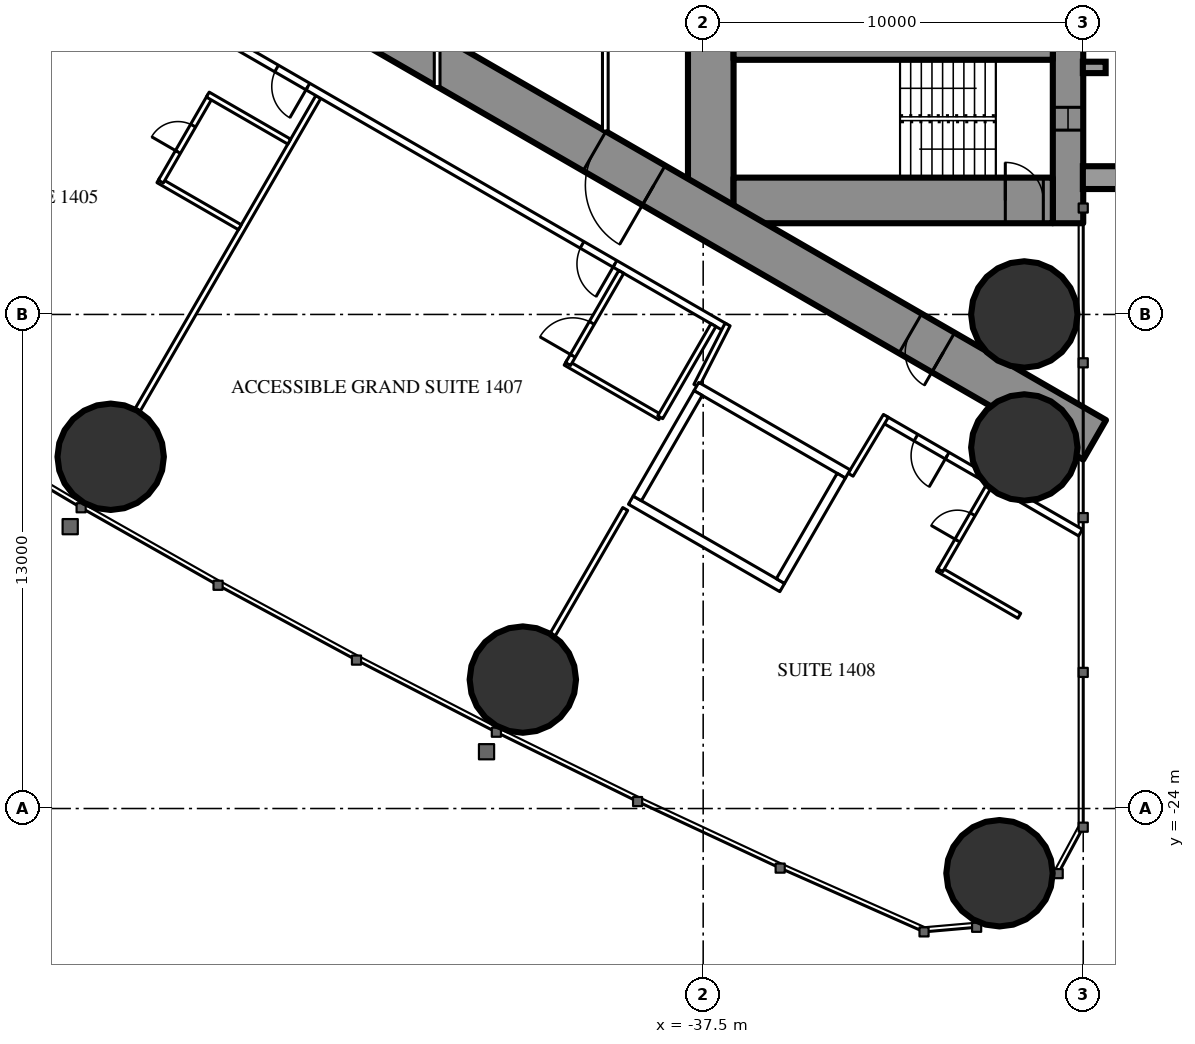
"""IFC4 building model, lengths in metres.
Left out: names, types, materials, properties, quantities, classifications, styles, units other than length and angle.
Written with IfcOpenShell. Run it as: python <this file> out.ifc"""

import sys

from ifc_helpers import new_model, si_unit, direction, frame, frame_2d, origin, origin_2d, place, context, subcontext, project, spatial, rectangle, hollow_circle, extrude, element, fill, save


model = new_model("IFC4")
c1 = context("Model", 3, precision=1e-05, world=origin(), true_north=direction((0.0, 1.0)))
c2 = subcontext(c1, "Body", "Model", "MODEL_VIEW")
j1 = project(units=[si_unit("LENGTHUNIT", "METRE"), si_unit("PLANEANGLEUNIT", "RADIAN")], contexts=[c1])
p1 = place(None, origin())
s1 = spatial("IfcSite", under=j1, at=p1, CompositionType="ELEMENT")
p2 = place(p1, origin())
s2 = spatial("IfcBuilding", under=s1, at=p2, CompositionType="ELEMENT")
p3 = place(p2, frame((0.0, 0.0, 56.5)))
s3 = spatial("IfcBuildingStorey", under=s2, at=p3, CompositionType="ELEMENT", Elevation=56.5)
for number, where, z_axis, x_axis in (
    (1, (-29.703, -25.703, 0.0), (0.0, 0.0, 1.0), (1.0, 0.0, 0.0)),
    (2, (-29.05, -11.0, 0.0), (0.0, 0.0, 1.0), (1.0, 0.0, 0.0)),
    (3, (-29.05, -14.5, 0.0), (0.0, 0.0, 1.0), (1.0, 0.0, 0.0)),
    (4, (-53.09, -14.745, 0.0), (0.0, 0.0, 1.0), (1.0, 0.0, 0.0)),
    (5, (-42.245, -20.607, 0.0), (0.0, 0.0, 1.0), (1.0, 0.0, 0.0)),
):
    element("IfcColumn", number, at=place(p3, frame(where, z_axis=z_axis, x_axis=x_axis)), inside=s3, PredefinedType="COLUMN", context=c2, shape_type="SweptSolid", body=[
        extrude(hollow_circle(Radius=1.4, WallThickness=0.12, at=origin_2d()), origin(), (0.0, 0.0, 1.0), 3.5),
    ])
p4 = place(p3, frame((-27.9, 8.6, 0.0), z_axis=(0.0, 0.0, 1.0), x_axis=(0.0, -1.0, 0.0)))
e6 = element("IfcWall", 6, at=p4, inside=s3, PredefinedType="SHEAR", context=c2, shape_type="SweptSolid", body=[
    extrude(rectangle(XDim=17.2, YDim=0.8, at=frame_2d((8.6, 0.0))), origin(), (0.0, 0.0, 1.0), 3.5),
])
p5 = place(p4, frame((2.45, 0.0, 0.6)))
e7 = element("IfcOpeningElement", 7, at=p5, cuts=e6, PredefinedType="OPENING", context=c2, shape_type="SweptSolid", body=[
    extrude(rectangle(XDim=0.6, YDim=2.1, at=frame_2d((0.3, 1.05))), frame((0.0, 0.41, 0.0), z_axis=(0.0, -1.0, 0.0), x_axis=(1.0, 0.0, 0.0)), (0.0, 0.0, 1.0), 0.82),
])
p6 = place(p4, frame((14.15, 0.0, 0.6)))
e8 = element("IfcOpeningElement", 8, at=p6, cuts=e6, PredefinedType="OPENING", context=c2, shape_type="SweptSolid", body=[
    extrude(rectangle(XDim=0.6, YDim=2.1, at=frame_2d((0.3, 1.05))), frame((0.0, 0.41, 0.0), z_axis=(0.0, -1.0, 0.0), x_axis=(1.0, 0.0, 0.0)), (0.0, 0.0, 1.0), 0.82),
])
p7 = place(p3, frame((-37.3, 8.6, 0.0), z_axis=(0.0, 0.0, 1.0), x_axis=(0.0, -1.0, 0.0)))
e9 = element("IfcWall", 9, at=p7, inside=s3, PredefinedType="SHEAR", context=c2, shape_type="SweptSolid", body=[
    extrude(rectangle(XDim=17.2, YDim=1.2, at=frame_2d((8.6, 0.0))), origin(), (0.0, 0.0, 1.0), 3.5),
])
p8 = place(p7, frame((7.7, 0.0, 0.0)))
e10 = element("IfcOpeningElement", 10, at=p8, cuts=e9, PredefinedType="OPENING", context=c2, shape_type="SweptSolid", body=[
    extrude(rectangle(XDim=1.8, YDim=2.2, at=frame_2d((0.9, 1.1))), frame((0.0, 0.61, 0.0), z_axis=(0.0, -1.0, 0.0), x_axis=(1.0, 0.0, 0.0)), (0.0, 0.0, 1.0), 1.22),
])
p9 = place(p3, frame((-28.3, -8.0, 0.0), z_axis=(0.0, 0.0, 1.0), x_axis=(-1.0, 0.0, 0.0)))
e11 = element("IfcWall", 11, at=p9, inside=s3, PredefinedType="SHEAR", context=c2, shape_type="SweptSolid", body=[
    extrude(rectangle(XDim=8.4, YDim=1.2, at=frame_2d((4.2, 0.0))), origin(), (0.0, 0.0, 1.0), 3.5),
])
p10 = place(p9, frame((0.25, 0.0, 0.0)))
e12 = element("IfcOpeningElement", 12, at=p10, cuts=e11, PredefinedType="OPENING", context=c2, shape_type="SweptSolid", body=[
    extrude(rectangle(XDim=1.0, YDim=2.2, at=frame_2d((0.5, 1.1))), frame((0.0, 0.61, 0.0), z_axis=(0.0, -1.0, 0.0), x_axis=(1.0, 0.0, 0.0)), (0.0, 0.0, 1.0), 1.22),
])
p11 = place(p3, frame((-28.3, -4.15, 0.0), z_axis=(0.0, 0.0, 1.0), x_axis=(-1.0, 0.0, 0.0)))
e13 = element("IfcWall", 13, at=p11, inside=s3, PredefinedType="SHEAR", context=c2, shape_type="SweptSolid", body=[
    extrude(rectangle(XDim=8.4, YDim=0.3, at=frame_2d((4.2, 0.0))), origin(), (0.0, 0.0, 1.0), 3.5),
])
p12 = place(p3, frame((-27.2, -14.3, 0.0), z_axis=(0.0, 0.0, 1.0), x_axis=(-0.866024021859, 0.500002393557, 0.0)))
e14 = element("IfcWall", 14, at=p12, inside=s3, PredefinedType="SHEAR", context=c2, shape_type="SweptSolid", body=[
    extrude(rectangle(XDim=27.907, YDim=1.2, at=frame_2d((13.954, 0.0))), origin(), (0.0, 0.0, 1.0), 3.5),
])
p13 = place(p12, frame((4.6, 0.0, 0.0)))
e15 = element("IfcOpeningElement", 15, at=p13, cuts=e14, PredefinedType="OPENING", context=c2, shape_type="SweptSolid", body=[
    extrude(rectangle(XDim=1.0, YDim=2.2, at=frame_2d((0.5, 1.1))), frame((0.0, 0.61, 0.0), z_axis=(0.0, -1.0, 0.0), x_axis=(1.0, 0.0, 0.0)), (0.0, 0.0, 1.0), 1.22),
])
p14 = place(p12, frame((13.395, 0.0, 0.0)))
e16 = element("IfcOpeningElement", 16, at=p14, cuts=e14, PredefinedType="OPENING", context=c2, shape_type="SweptSolid", body=[
    extrude(rectangle(XDim=1.8, YDim=2.2, at=frame_2d((0.9, 1.1))), frame((0.0, 0.61, 0.0), z_axis=(0.0, -1.0, 0.0), x_axis=(1.0, 0.0, 0.0)), (0.0, 0.0, 1.0), 1.22),
])
p15 = place(p3, frame((-47.627, -5.278, 0.0), z_axis=(0.0, 0.0, 1.0), x_axis=(-0.500009844318, -0.86601972009, 0.0)))
e17 = element("IfcWall", 17, at=p15, inside=s3, PredefinedType="PARTITIONING", context=c2, shape_type="SweptSolid", body=[
    extrude(rectangle(XDim=9.51, YDim=0.15, at=frame_2d((4.755, 0.0))), origin(), (0.0, 0.0, 1.0), 2.25),
])
p16 = place(p3, frame((-39.551, -16.118, 0.0), z_axis=(0.0, 0.0, 1.0), x_axis=(-0.499986503906, -0.866033195618, 0.0)))
e18 = element("IfcWall", 18, at=p16, inside=s3, PredefinedType="PARTITIONING", context=c2, shape_type="SweptSolid", body=[
    extrude(rectangle(XDim=3.815, YDim=0.15, at=frame_2d((1.907, 0.0))), origin(), (0.0, 0.0, 1.0), 3.25),
])
p17 = place(p3, frame((-27.572, -16.741, 0.0), z_axis=(0.0, 0.0, 1.0), x_axis=(-0.866024464444, 0.500001626982, 0.0)))
e19 = element("IfcWall", 19, at=p17, inside=s3, PredefinedType="PARTITIONING", context=c2, shape_type="SweptSolid", body=[
    extrude(rectangle(XDim=5.955, YDim=0.2, at=frame_2d((2.978, 0.0))), origin(), (0.0, 0.0, 1.0), 3.25),
])
p18 = place(p17, frame((4.05, 0.0, 0.0)))
e20 = element("IfcOpeningElement", 20, at=p18, cuts=e19, PredefinedType="OPENING", context=c2, shape_type="SweptSolid", body=[
    extrude(rectangle(XDim=0.95, YDim=2.2, at=frame_2d((0.475, 1.1))), frame((0.0, 0.11, 0.0), z_axis=(0.0, -1.0, 0.0), x_axis=(1.0, 0.0, 0.0)), (0.0, 0.0, 1.0), 0.22),
])
p19 = place(p3, frame((-36.92, -11.344, 0.0), z_axis=(0.0, 0.0, 1.0), x_axis=(-0.866028313256, 0.499994960614, 0.0)))
e21 = element("IfcWall", 21, at=p19, inside=s3, PredefinedType="PARTITIONING", context=c2, shape_type="SweptSolid", body=[
    extrude(rectangle(XDim=22.568, YDim=0.2, at=frame_2d((11.284, 0.0))), origin(), (0.0, 0.0, 1.0), 3.25),
])
p20 = place(p19, frame((12.68, 0.0, 0.0)))
e22 = element("IfcOpeningElement", 22, at=p20, cuts=e21, PredefinedType="OPENING", context=c2, shape_type="SweptSolid", body=[
    extrude(rectangle(XDim=0.95, YDim=2.2, at=frame_2d((0.475, 1.1))), frame((0.0, 0.11, 0.0), z_axis=(0.0, -1.0, 0.0), x_axis=(1.0, 0.0, 0.0)), (0.0, 0.0, 1.0), 0.22),
])
p21 = place(p19, frame((3.35, 0.0, 0.0)))
e23 = element("IfcOpeningElement", 23, at=p21, cuts=e21, PredefinedType="OPENING", context=c2, shape_type="SweptSolid", body=[
    extrude(rectangle(XDim=1.0, YDim=2.2, at=frame_2d((0.5, 1.1))), frame((0.0, 0.11, 0.0), z_axis=(0.0, -1.0, 0.0), x_axis=(1.0, 0.0, 0.0)), (0.0, 0.0, 1.0), 0.22),
])
p22 = place(p3, frame((-36.857, -11.265, 0.0), z_axis=(0.0, 0.0, 1.0), x_axis=(-0.454225294761, -0.890886851176, 0.0)))
e24 = element("IfcWall", 24, at=p22, inside=s3, PredefinedType="PARTITIONING", context=c2, shape_type="SweptSolid", body=[
    extrude(rectangle(XDim=1.807, YDim=0.15, at=frame_2d((0.904, 0.0))), origin(), (0.0, 0.0, 1.0), 3.25),
])
p23 = place(p3, frame((-33.621, -15.218, 0.0), z_axis=(0.0, 0.0, 1.0), x_axis=(0.514336634837, 0.857588377991, 0.0)))
e25 = element("IfcWall", 25, at=p23, inside=s3, PredefinedType="PARTITIONING", context=c2, shape_type="SweptSolid", body=[
    extrude(rectangle(XDim=1.805, YDim=0.15, at=frame_2d((0.903, 0.0))), origin(), (0.0, 0.0, 1.0), 3.25),
])
p24 = place(p3, frame((-49.692, -8.704, 0.0), z_axis=(0.0, 0.0, 1.0), x_axis=(-0.866073894602, 0.499916002032, 0.0)))
e26 = element("IfcWall", 26, at=p24, inside=s3, PredefinedType="PARTITIONING", context=c2, shape_type="SweptSolid", body=[
    extrude(rectangle(XDim=2.475, YDim=0.15, at=frame_2d((1.238, 0.0))), origin(), (0.0, 0.0, 1.0), 3.25),
])
p25 = place(p3, frame((-50.47, -5.253, 0.0), z_axis=(0.0, 0.0, 1.0), x_axis=(-0.500006934395, -0.866021400173, 0.0)))
e27 = element("IfcWall", 27, at=p25, inside=s3, PredefinedType="PARTITIONING", context=c2, shape_type="SweptSolid", body=[
    extrude(rectangle(XDim=2.6, YDim=0.15, at=frame_2d((1.3, 0.0))), origin(), (0.0, 0.0, 1.0), 3.25),
])
p26 = place(p25, frame((0.9, 0.0, 0.0)))
e28 = element("IfcOpeningElement", 28, at=p26, cuts=e27, PredefinedType="OPENING", context=c2, shape_type="SweptSolid", body=[
    extrude(rectangle(XDim=0.8, YDim=2.2, at=frame_2d((0.4, 1.1))), frame((0.0, 0.085, 0.0), z_axis=(0.0, -1.0, 0.0), x_axis=(1.0, 0.0, 0.0)), (0.0, 0.0, 1.0), 0.17),
])
p27 = place(p3, frame((-48.392, -6.453, 0.0), z_axis=(0.0, 0.0, 1.0), x_axis=(-0.86604923931, 0.499958713387, 0.0)))
e29 = element("IfcWall", 29, at=p27, inside=s3, PredefinedType="PARTITIONING", context=c2, shape_type="SweptSolid", body=[
    extrude(rectangle(XDim=2.475, YDim=0.15, at=frame_2d((1.237, 0.0))), origin(), (0.0, 0.0, 1.0), 3.25),
])
p28 = place(p3, frame((-38.63, -13.705, 0.0), z_axis=(0.0, 0.0, 1.0), x_axis=(-0.866018712932, 0.500011588718, 0.0)))
e30 = element("IfcWall", 30, at=p28, inside=s3, PredefinedType="PARTITIONING", context=c2, shape_type="SweptSolid", body=[
    extrude(rectangle(XDim=2.875, YDim=0.15, at=frame_2d((1.438, 0.0))), origin(), (0.0, 0.0, 1.0), 3.25),
])
p29 = place(p3, frame((-39.655, -9.88, 0.0), z_axis=(0.0, 0.0, 1.0), x_axis=(-0.500049511043, -0.865996816683, 0.0)))
e31 = element("IfcWall", 31, at=p29, inside=s3, PredefinedType="PARTITIONING", context=c2, shape_type="SweptSolid", body=[
    extrude(rectangle(XDim=2.8, YDim=0.15, at=frame_2d((1.4, 0.0))), origin(), (0.0, 0.0, 1.0), 3.25),
])
p30 = place(p29, frame((1.55, 0.0, 0.0)))
e32 = element("IfcOpeningElement", 32, at=p30, cuts=e31, PredefinedType="OPENING", context=c2, shape_type="SweptSolid", body=[
    extrude(rectangle(XDim=1.0, YDim=2.2, at=frame_2d((0.5, 1.1))), frame((0.0, 0.085, 0.0), z_axis=(0.0, -1.0, 0.0), x_axis=(1.0, 0.0, 0.0)), (0.0, 0.0, 1.0), 0.17),
])
p31 = place(p3, frame((-37.23, -11.281, 0.0), z_axis=(0.0, 0.0, 1.0), x_axis=(-0.500049511043, -0.865996816683, 0.0)))
e33 = element("IfcWall", 33, at=p31, inside=s3, PredefinedType="PARTITIONING", context=c2, shape_type="SweptSolid", body=[
    extrude(rectangle(XDim=2.8, YDim=0.15, at=frame_2d((1.4, 0.0))), origin(), (0.0, 0.0, 1.0), 3.25),
])
p32 = place(p3, frame((-29.182, -18.929, 0.0), z_axis=(0.0, 0.0, 1.0), x_axis=(-0.866006523861, 0.500032699561, 0.0)))
e34 = element("IfcWall", 34, at=p32, inside=s3, PredefinedType="PARTITIONING", context=c2, shape_type="SweptSolid", body=[
    extrude(rectangle(XDim=2.475, YDim=0.15, at=frame_2d((1.237, 0.0))), origin(), (0.0, 0.0, 1.0), 3.25),
])
p33 = place(p3, frame((-29.96, -15.478, 0.0), z_axis=(0.0, 0.0, 1.0), x_axis=(-0.500006934395, -0.866021400173, 0.0)))
e35 = element("IfcWall", 35, at=p33, inside=s3, PredefinedType="PARTITIONING", context=c2, shape_type="SweptSolid", body=[
    extrude(rectangle(XDim=2.6, YDim=0.15, at=frame_2d((1.3, 0.0))), origin(), (0.0, 0.0, 1.0), 3.25),
])
p34 = place(p33, frame((0.9, 0.0, 0.0)))
e36 = element("IfcOpeningElement", 36, at=p34, cuts=e35, PredefinedType="OPENING", context=c2, shape_type="SweptSolid", body=[
    extrude(rectangle(XDim=0.8, YDim=2.2, at=frame_2d((0.4, 1.1))), frame((0.0, 0.085, 0.0), z_axis=(0.0, -1.0, 0.0), x_axis=(1.0, 0.0, 0.0)), (0.0, 0.0, 1.0), 0.17),
])
p35 = place(p3, frame((-40.075, 1.2, 0.0), z_axis=(0.0, 0.0, 1.0), x_axis=(0.0, -1.0, 0.0)))
e37 = element("IfcWall", 37, at=p35, inside=s3, PredefinedType="PARTITIONING", context=c2, shape_type="SweptSolid", body=[
    extrude(rectangle(XDim=7.374, YDim=0.15, at=frame_2d((3.687, 0.0))), origin(), (0.0, 0.0, 1.0), 3.25),
])
p36 = place(p35, frame((2.787, 0.0, 0.0)))
e38 = element("IfcOpeningElement", 38, at=p36, cuts=e37, PredefinedType="OPENING", context=c2, shape_type="SweptSolid", body=[
    extrude(rectangle(XDim=1.8, YDim=2.2, at=frame_2d((0.9, 1.1))), frame((0.0, 0.085, 0.0), z_axis=(0.0, -1.0, 0.0), x_axis=(1.0, 0.0, 0.0)), (0.0, 0.0, 1.0), 0.17),
])
p37 = place(p3, frame((-44.5, 5.005, 0.0), z_axis=(0.0, 0.0, 1.0), x_axis=(0.0, -1.0, 0.0)))
e39 = element("IfcWall", 39, at=p37, inside=s3, PredefinedType="PARTITIONING", context=c2, shape_type="SweptSolid", body=[
    extrude(rectangle(XDim=10.009, YDim=0.15, at=frame_2d((5.005, 0.0))), origin(), (0.0, 0.0, 1.0), 2.45),
])
p38 = place(p37, frame((4.505, 0.0, 0.0)))
e40 = element("IfcOpeningElement", 40, at=p38, cuts=e39, PredefinedType="OPENING", context=c2, shape_type="SweptSolid", body=[
    extrude(rectangle(XDim=1.0, YDim=2.2, at=frame_2d((0.5, 1.1))), frame((0.0, 0.085, 0.0), z_axis=(0.0, -1.0, 0.0), x_axis=(1.0, 0.0, 0.0)), (0.0, 0.0, 1.0), 0.17),
])
p39 = place(p3, frame((-33.696, -15.197, 0.0), z_axis=(0.0, 0.0, 1.0), x_axis=(-0.865976953817, 0.500083908417, 0.0)))
e41 = element("IfcWall", 41, at=p39, inside=s3, PredefinedType="PARTITIONING", context=c2, shape_type="SweptSolid", body=[
    extrude(rectangle(XDim=4.599, YDim=0.25, at=frame_2d((2.3, 0.0))), origin(), (0.0, 0.0, 1.0), 3.25),
])
p40 = place(p3, frame((-35.42, -18.186, 0.0), z_axis=(0.0, 0.0, 1.0), x_axis=(-0.865990227814, 0.50006092162, 0.0)))
e42 = element("IfcWall", 42, at=p40, inside=s3, PredefinedType="PARTITIONING", context=c2, shape_type="SweptSolid", body=[
    extrude(rectangle(XDim=4.6, YDim=0.25, at=frame_2d((2.3, 0.0))), origin(), (0.0, 0.0, 1.0), 3.25),
])
p41 = place(p3, frame((-33.866, -15.243, 0.0), z_axis=(0.0, 0.0, 1.0), x_axis=(-0.499929347863, -0.866066190972, 0.0)))
e43 = element("IfcWall", 43, at=p41, inside=s3, PredefinedType="PARTITIONING", context=c2, shape_type="SweptSolid", body=[
    extrude(rectangle(XDim=3.201, YDim=0.25, at=frame_2d((1.6, 0.0))), origin(), (0.0, 0.0, 1.0), 3.25),
])
p42 = place(p3, frame((-37.633, -13.068, 0.0), z_axis=(0.0, 0.0, 1.0), x_axis=(-0.499872130319, -0.866099216793, 0.0)))
e44 = element("IfcWall", 44, at=p42, inside=s3, PredefinedType="PARTITIONING", context=c2, shape_type="SweptSolid", body=[
    extrude(rectangle(XDim=3.2, YDim=0.25, at=frame_2d((1.6, 0.0))), origin(), (0.0, 0.0, 1.0), 3.25),
])
p43 = place(p26, origin())
e45 = element("IfcDoor", 45, at=p43, inside=s3, OperationType="SINGLE_SWING_RIGHT", PredefinedType="DOOR", context=c2, shape_type="SweptSolid", body=[
    extrude(rectangle(XDim=0.8, YDim=2.2, at=frame_2d((0.4, 1.1))), frame((0.0, 0.025, 0.0), z_axis=(0.0, -1.0, 0.0), x_axis=(1.0, 0.0, 0.0)), (0.0, 0.0, 1.0), 0.05),
])
fill(e28, e45)
p44 = place(p20, origin())
e46 = element("IfcDoor", 46, at=p44, inside=s3, OperationType="SINGLE_SWING_LEFT", PredefinedType="DOOR", context=c2, shape_type="SweptSolid", body=[
    extrude(rectangle(XDim=0.95, YDim=2.2, at=frame_2d((0.475, 1.1))), frame((0.0, 0.025, 0.0), z_axis=(0.0, -1.0, 0.0), x_axis=(1.0, 0.0, 0.0)), (0.0, 0.0, 1.0), 0.05),
])
fill(e22, e46)
p45 = place(p30, origin())
e47 = element("IfcDoor", 47, at=p45, inside=s3, OperationType="SINGLE_SWING_RIGHT", PredefinedType="DOOR", context=c2, shape_type="SweptSolid", body=[
    extrude(rectangle(XDim=1.0, YDim=2.2, at=frame_2d((0.5, 1.1))), frame((0.0, 0.025, 0.0), z_axis=(0.0, -1.0, 0.0), x_axis=(1.0, 0.0, 0.0)), (0.0, 0.0, 1.0), 0.05),
])
fill(e32, e47)
p46 = place(p21, origin())
e48 = element("IfcDoor", 48, at=p46, inside=s3, OperationType="SINGLE_SWING_LEFT", PredefinedType="DOOR", context=c2, shape_type="SweptSolid", body=[
    extrude(rectangle(XDim=1.0, YDim=2.2, at=frame_2d((0.5, 1.1))), frame((0.0, 0.025, 0.0), z_axis=(0.0, -1.0, 0.0), x_axis=(1.0, 0.0, 0.0)), (0.0, 0.0, 1.0), 0.05),
])
fill(e23, e48)
p47 = place(p34, origin())
e49 = element("IfcDoor", 49, at=p47, inside=s3, OperationType="SINGLE_SWING_RIGHT", PredefinedType="DOOR", context=c2, shape_type="SweptSolid", body=[
    extrude(rectangle(XDim=0.8, YDim=2.2, at=frame_2d((0.4, 1.1))), frame((0.0, 0.025, 0.0), z_axis=(0.0, -1.0, 0.0), x_axis=(1.0, 0.0, 0.0)), (0.0, 0.0, 1.0), 0.05),
])
fill(e36, e49)
p48 = place(p18, origin())
e50 = element("IfcDoor", 50, at=p48, inside=s3, OperationType="SINGLE_SWING_LEFT", PredefinedType="DOOR", context=c2, shape_type="SweptSolid", body=[
    extrude(rectangle(XDim=0.95, YDim=2.2, at=frame_2d((0.475, 1.1))), frame((0.0, 0.025, 0.0), z_axis=(0.0, -1.0, 0.0), x_axis=(1.0, 0.0, 0.0)), (0.0, 0.0, 1.0), 0.05),
])
fill(e20, e50)
p49 = place(p13, origin())
e51 = element("IfcDoor", 51, at=p49, inside=s3, OperationType="SINGLE_SWING_LEFT", PredefinedType="DOOR", context=c2, shape_type="SweptSolid", body=[
    extrude(rectangle(XDim=1.0, YDim=2.2, at=frame_2d((0.5, 1.1))), frame((0.0, 0.025, 0.0), z_axis=(0.0, -1.0, 0.0), x_axis=(1.0, 0.0, 0.0)), (0.0, 0.0, 1.0), 0.05),
])
fill(e15, e51)
p50 = place(p14, origin())
e52 = element("IfcDoor", 52, at=p50, inside=s3, OperationType="DOUBLE_DOOR_SINGLE_SWING", PredefinedType="DOOR", context=c2, shape_type="SweptSolid", body=[
    extrude(rectangle(XDim=1.8, YDim=2.2, at=frame_2d((0.9, 1.1))), frame((0.0, 0.025, 0.0), z_axis=(0.0, -1.0, 0.0), x_axis=(1.0, 0.0, 0.0)), (0.0, 0.0, 1.0), 0.05),
])
fill(e16, e52)
p51 = place(p10, origin())
e53 = element("IfcDoor", 53, at=p51, inside=s3, OperationType="SINGLE_SWING_RIGHT", PredefinedType="DOOR", context=c2, shape_type="SweptSolid", body=[
    extrude(rectangle(XDim=1.0, YDim=2.2, at=frame_2d((0.5, 1.1))), frame((0.0, 0.025, 0.0), z_axis=(0.0, -1.0, 0.0), x_axis=(1.0, 0.0, 0.0)), (0.0, 0.0, 1.0), 0.05),
])
fill(e12, e53)
p52 = place(p6, origin())
e54 = element("IfcWindow", 54, at=p52, inside=s3, PartitioningType="SINGLE_PANEL", PredefinedType="WINDOW", context=c2, shape_type="SweptSolid", body=[
    extrude(rectangle(XDim=0.6, YDim=2.1, at=frame_2d((0.3, 1.05))), frame((0.0, 0.03, 0.0), z_axis=(0.0, -1.0, 0.0), x_axis=(1.0, 0.0, 0.0)), (0.0, 0.0, 1.0), 0.06),
])
fill(e8, e54)
save(model, sys.argv[1])
